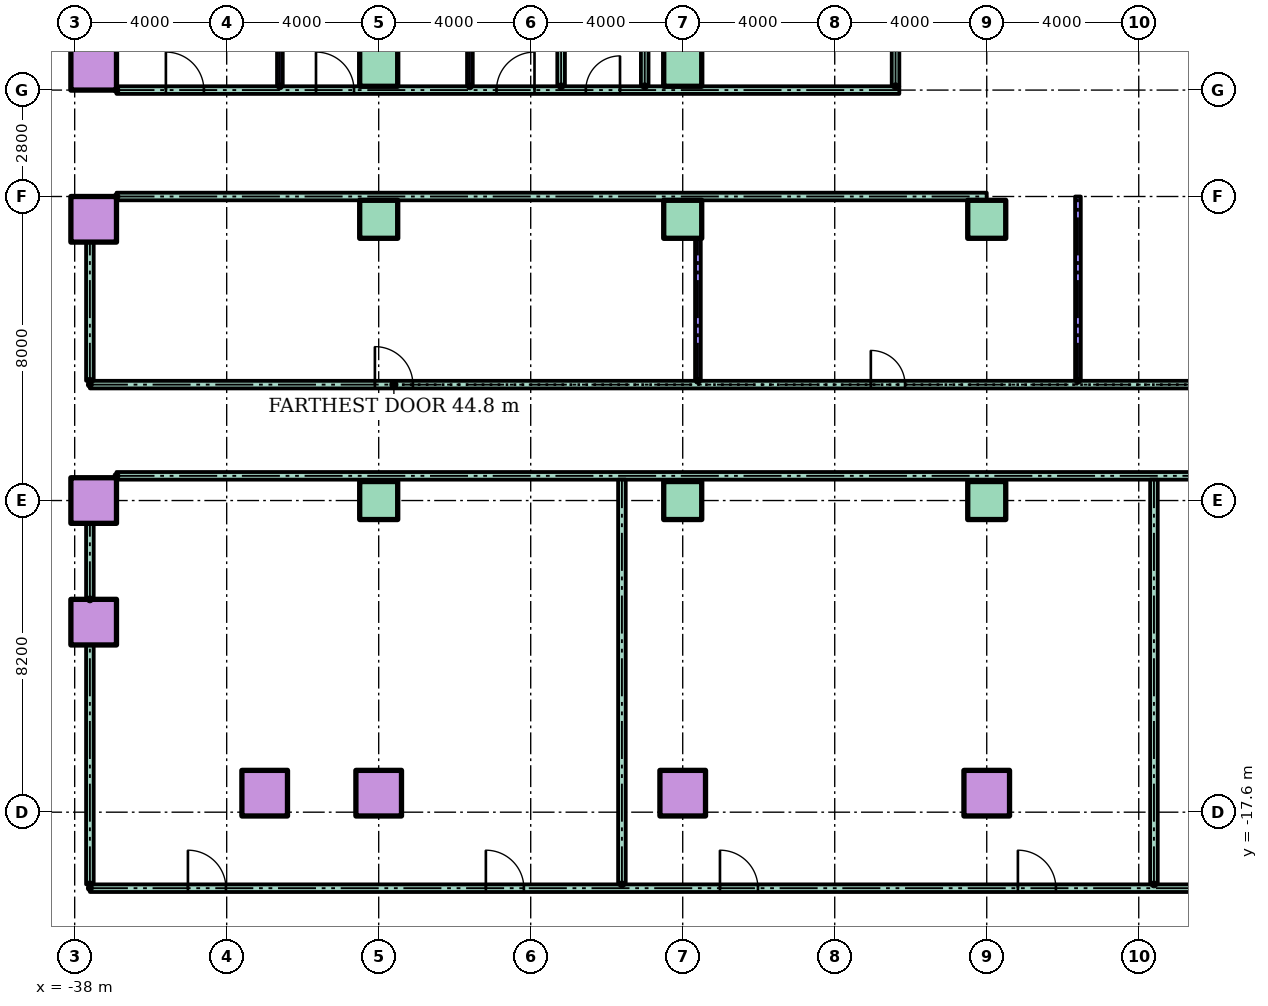
"""IFC4 building model, lengths in metres.
Left out: names, types, materials, properties, quantities, classifications, styles, units other than length and angle.
Written with IfcOpenShell. Run it as: python <this file> out.ifc"""

import sys

from ifc_helpers import new_model, si_unit, direction, frame, frame_2d, origin, origin_2d, place, context, subcontext, project, spatial, rectangle, hollow_rectangle, extrude, element, fill, save


model = new_model("IFC4")
c1 = context("Model", 3, precision=1e-05, world=origin(), true_north=direction((0.0, 1.0)))
c2 = subcontext(c1, "Body", "Model", "MODEL_VIEW")
j1 = project(units=[si_unit("LENGTHUNIT", "METRE"), si_unit("PLANEANGLEUNIT", "RADIAN")], contexts=[c1])
p1 = place(None, origin())
s1 = spatial("IfcSite", under=j1, at=p1, CompositionType="ELEMENT")
p2 = place(p1, origin())
s2 = spatial("IfcBuilding", under=s1, at=p2, CompositionType="ELEMENT")
p3 = place(p2, frame((0.0, 0.0, 18.0)))
s3 = spatial("IfcBuildingStorey", under=s2, at=p3, CompositionType="ELEMENT", Elevation=18.0)
for number, where in (
    (1, (-33.0, -17.1, 0.0)),
    (2, (-30.0, -17.1, 0.0)),
    (3, (-22.0, -17.1, 0.0)),
    (4, (-14.0, -17.1, 0.0)),
    (5, (-37.5, -12.6, 0.0)),
    (6, (-37.5, -9.4, 0.0)),
):
    element("IfcColumn", number, at=place(p3, frame(where)), inside=s3, PredefinedType="COLUMN", context=c2, shape_type="SweptSolid", body=[
        extrude(hollow_rectangle(XDim=1.2, YDim=1.2, WallThickness=0.06, at=origin_2d()), origin(), (0.0, 0.0, 1.0), 4.0),
    ])
for number, where in (
    (7, (-30.0, -9.4, 0.0)),
    (8, (-22.0, -9.4, 0.0)),
    (9, (-14.0, -9.4, 0.0)),
):
    element("IfcColumn", number, at=place(p3, frame(where)), inside=s3, PredefinedType="COLUMN", context=c2, shape_type="SweptSolid", body=[
        extrude(rectangle(XDim=1.0, YDim=1.0, at=origin_2d()), origin(), (0.0, 0.0, 1.0), 4.0),
    ])
p4 = place(p3, frame((-37.5, -2.0, 0.0)))
e10 = element("IfcColumn", 10, at=p4, inside=s3, PredefinedType="COLUMN", context=c2, shape_type="SweptSolid", body=[
    extrude(hollow_rectangle(XDim=1.2, YDim=1.2, WallThickness=0.06, at=origin_2d()), origin(), (0.0, 0.0, 1.0), 4.0),
])
for number, where in (
    (11, (-30.0, -2.0, 0.0)),
    (12, (-22.0, -2.0, 0.0)),
    (13, (-14.0, -2.0, 0.0)),
):
    element("IfcColumn", number, at=place(p3, frame(where)), inside=s3, PredefinedType="COLUMN", context=c2, shape_type="SweptSolid", body=[
        extrude(rectangle(XDim=1.0, YDim=1.0, at=origin_2d()), origin(), (0.0, 0.0, 1.0), 4.0),
    ])
p5 = place(p3, frame((-37.5, 2.0, 0.0)))
e14 = element("IfcColumn", 14, at=p5, inside=s3, PredefinedType="COLUMN", context=c2, shape_type="SweptSolid", body=[
    extrude(hollow_rectangle(XDim=1.2, YDim=1.2, WallThickness=0.06, at=origin_2d()), origin(), (0.0, 0.0, 1.0), 4.0),
])
for number, where in (
    (15, (-30.0, 2.0, 0.0)),
    (16, (-22.0, 2.0, 0.0)),
):
    element("IfcColumn", number, at=place(p3, frame(where)), inside=s3, PredefinedType="COLUMN", context=c2, shape_type="SweptSolid", body=[
        extrude(rectangle(XDim=1.0, YDim=1.0, at=origin_2d()), origin(), (0.0, 0.0, 1.0), 4.0),
    ])
p6 = place(p3, frame((-37.6, -19.6, 0.0)))
e17 = element("IfcWall", 17, at=p6, inside=s3, PredefinedType="PARTITIONING", context=c2, shape_type="SweptSolid", body=[
    extrude(rectangle(XDim=75.2, YDim=0.2, at=frame_2d((37.6, 0.0))), origin(), (0.0, 0.0, 1.0), 3.7),
])
p7 = place(p6, frame((2.58, 0.0, 0.0)))
e18 = element("IfcOpeningElement", 18, at=p7, cuts=e17, PredefinedType="OPENING", context=c2, shape_type="SweptSolid", body=[
    extrude(rectangle(XDim=1.0, YDim=2.1, at=frame_2d((0.5, 1.05))), frame((0.0, 0.11, 0.0), z_axis=(0.0, -1.0, 0.0), x_axis=(1.0, 0.0, 0.0)), (0.0, 0.0, 1.0), 0.22),
])
p8 = place(p6, frame((10.42, 0.0, 0.0)))
e19 = element("IfcOpeningElement", 19, at=p8, cuts=e17, PredefinedType="OPENING", context=c2, shape_type="SweptSolid", body=[
    extrude(rectangle(XDim=1.0, YDim=2.1, at=frame_2d((0.5, 1.05))), frame((0.0, 0.11, 0.0), z_axis=(0.0, -1.0, 0.0), x_axis=(1.0, 0.0, 0.0)), (0.0, 0.0, 1.0), 0.22),
])
p9 = place(p6, frame((16.58, 0.0, 0.0)))
e20 = element("IfcOpeningElement", 20, at=p9, cuts=e17, PredefinedType="OPENING", context=c2, shape_type="SweptSolid", body=[
    extrude(rectangle(XDim=1.0, YDim=2.1, at=frame_2d((0.5, 1.05))), frame((0.0, 0.11, 0.0), z_axis=(0.0, -1.0, 0.0), x_axis=(1.0, 0.0, 0.0)), (0.0, 0.0, 1.0), 0.22),
])
p10 = place(p6, frame((24.42, 0.0, 0.0)))
e21 = element("IfcOpeningElement", 21, at=p10, cuts=e17, PredefinedType="OPENING", context=c2, shape_type="SweptSolid", body=[
    extrude(rectangle(XDim=1.0, YDim=2.1, at=frame_2d((0.5, 1.05))), frame((0.0, 0.11, 0.0), z_axis=(0.0, -1.0, 0.0), x_axis=(1.0, 0.0, 0.0)), (0.0, 0.0, 1.0), 0.22),
])
p11 = place(p6, frame((33.0, 0.0, 0.0)))
e22 = element("IfcOpeningElement", 22, at=p11, cuts=e17, PredefinedType="OPENING", context=c2, shape_type="SweptSolid", body=[
    extrude(rectangle(XDim=1.0, YDim=2.1, at=frame_2d((0.5, 1.05))), frame((0.0, 0.11, 0.0), z_axis=(0.0, -1.0, 0.0), x_axis=(1.0, 0.0, 0.0)), (0.0, 0.0, 1.0), 0.22),
])
p12 = place(p6, frame((44.0, 0.0, 0.0)))
e23 = element("IfcOpeningElement", 23, at=p12, cuts=e17, PredefinedType="OPENING", context=c2, shape_type="SweptSolid", body=[
    extrude(rectangle(XDim=1.0, YDim=2.1, at=frame_2d((0.5, 1.05))), frame((0.0, 0.11, 0.0), z_axis=(0.0, -1.0, 0.0), x_axis=(1.0, 0.0, 0.0)), (0.0, 0.0, 1.0), 0.22),
])
p13 = place(p6, frame((55.8, 0.0, 0.0)))
e24 = element("IfcOpeningElement", 24, at=p13, cuts=e17, PredefinedType="OPENING", context=c2, shape_type="SweptSolid", body=[
    extrude(rectangle(XDim=1.0, YDim=2.1, at=frame_2d((0.5, 1.05))), frame((0.0, 0.11, 0.0), z_axis=(0.0, -1.0, 0.0), x_axis=(1.0, 0.0, 0.0)), (0.0, 0.0, 1.0), 0.22),
])
p14 = place(p6, frame((68.45, 0.0, 0.0)))
e25 = element("IfcOpeningElement", 25, at=p14, cuts=e17, PredefinedType="OPENING", context=c2, shape_type="SweptSolid", body=[
    extrude(rectangle(XDim=0.9, YDim=2.1, at=frame_2d((0.45, 1.05))), frame((0.0, 0.11, 0.0), z_axis=(0.0, -1.0, 0.0), x_axis=(1.0, 0.0, 0.0)), (0.0, 0.0, 1.0), 0.22),
])
p15 = place(p3, frame((-36.9, -8.75, 0.0)))
e26 = element("IfcWall", 26, at=p15, inside=s3, PredefinedType="PARTITIONING", context=c2, shape_type="SweptSolid", body=[
    extrude(rectangle(XDim=73.8, YDim=0.2, at=frame_2d((36.9, 0.0))), origin(), (0.0, 0.0, 1.0), 3.7),
])
p16 = place(p3, frame((-37.6, -6.35, 0.0)))
e27 = element("IfcWall", 27, at=p16, inside=s3, PredefinedType="PARTITIONING", context=c2, shape_type="SweptSolid", body=[
    extrude(rectangle(XDim=75.2, YDim=0.2, at=frame_2d((37.6, 0.0))), origin(), (0.0, 0.0, 1.0), 3.7),
])
p17 = place(p16, frame((7.5, 0.0, 0.0)))
e28 = element("IfcOpeningElement", 28, at=p17, cuts=e27, PredefinedType="OPENING", context=c2, shape_type="SweptSolid", body=[
    extrude(rectangle(XDim=1.0, YDim=2.1, at=frame_2d((0.5, 1.05))), frame((0.0, 0.11, 0.0), z_axis=(0.0, -1.0, 0.0), x_axis=(1.0, 0.0, 0.0)), (0.0, 0.0, 1.0), 0.22),
])
p18 = place(p16, frame((20.55, 0.0, 0.0)))
e29 = element("IfcOpeningElement", 29, at=p18, cuts=e27, PredefinedType="OPENING", context=c2, shape_type="SweptSolid", body=[
    extrude(rectangle(XDim=0.9, YDim=2.1, at=frame_2d((0.45, 1.05))), frame((0.0, 0.11, 0.0), z_axis=(0.0, -1.0, 0.0), x_axis=(1.0, 0.0, 0.0)), (0.0, 0.0, 1.0), 0.22),
])
p19 = place(p16, frame((30.55, 0.0, 0.0)))
e30 = element("IfcOpeningElement", 30, at=p19, cuts=e27, PredefinedType="OPENING", context=c2, shape_type="SweptSolid", body=[
    extrude(rectangle(XDim=0.9, YDim=2.1, at=frame_2d((0.45, 1.05))), frame((0.0, 0.11, 0.0), z_axis=(0.0, -1.0, 0.0), x_axis=(1.0, 0.0, 0.0)), (0.0, 0.0, 1.0), 0.22),
])
p20 = place(p16, frame((41.5, 0.0, 0.0)))
e31 = element("IfcOpeningElement", 31, at=p20, cuts=e27, PredefinedType="OPENING", context=c2, shape_type="SweptSolid", body=[
    extrude(rectangle(XDim=1.0, YDim=2.1, at=frame_2d((0.5, 1.05))), frame((0.0, 0.11, 0.0), z_axis=(0.0, -1.0, 0.0), x_axis=(1.0, 0.0, 0.0)), (0.0, 0.0, 1.0), 0.22),
])
p21 = place(p16, frame((61.1, 0.0, 0.0)))
e32 = element("IfcOpeningElement", 32, at=p21, cuts=e27, PredefinedType="OPENING", context=c2, shape_type="SweptSolid", body=[
    extrude(rectangle(XDim=1.0, YDim=2.1, at=frame_2d((0.5, 1.05))), frame((0.0, 0.11, 0.0), z_axis=(0.0, -1.0, 0.0), x_axis=(1.0, 0.0, 0.0)), (0.0, 0.0, 1.0), 0.22),
])
p22 = place(p3, frame((-36.9, -1.4, 0.0)))
e33 = element("IfcWall", 33, at=p22, inside=s3, PredefinedType="PARTITIONING", context=c2, shape_type="SweptSolid", body=[
    extrude(rectangle(XDim=22.9, YDim=0.2, at=frame_2d((11.45, 0.0))), origin(), (0.0, 0.0, 1.0), 3.7),
])
p23 = place(p3, frame((-36.9, 1.4, 0.0)))
e34 = element("IfcWall", 34, at=p23, inside=s3, PredefinedType="PARTITIONING", context=c2, shape_type="SweptSolid", body=[
    extrude(rectangle(XDim=20.6, YDim=0.2, at=frame_2d((10.3, 0.0))), origin(), (0.0, 0.0, 1.0), 3.7),
])
p24 = place(p23, frame((1.3, 0.0, 0.0)))
e35 = element("IfcOpeningElement", 35, at=p24, cuts=e34, PredefinedType="OPENING", context=c2, shape_type="SweptSolid", body=[
    extrude(rectangle(XDim=1.0, YDim=2.1, at=frame_2d((0.5, 1.05))), frame((0.0, 0.11, 0.0), z_axis=(0.0, -1.0, 0.0), x_axis=(1.0, 0.0, 0.0)), (0.0, 0.0, 1.0), 0.22),
])
p25 = place(p23, frame((5.25, 0.0, 0.0)))
e36 = element("IfcOpeningElement", 36, at=p25, cuts=e34, PredefinedType="OPENING", context=c2, shape_type="SweptSolid", body=[
    extrude(rectangle(XDim=1.0, YDim=2.1, at=frame_2d((0.5, 1.05))), frame((0.0, 0.11, 0.0), z_axis=(0.0, -1.0, 0.0), x_axis=(1.0, 0.0, 0.0)), (0.0, 0.0, 1.0), 0.22),
])
p26 = place(p23, frame((10.0, 0.0, 0.0)))
e37 = element("IfcOpeningElement", 37, at=p26, cuts=e34, PredefinedType="OPENING", context=c2, shape_type="SweptSolid", body=[
    extrude(rectangle(XDim=1.0, YDim=2.1, at=frame_2d((0.5, 1.05))), frame((0.0, 0.11, 0.0), z_axis=(0.0, -1.0, 0.0), x_axis=(1.0, 0.0, 0.0)), (0.0, 0.0, 1.0), 0.22),
])
p27 = place(p23, frame((12.35, 0.0, 0.0)))
e38 = element("IfcOpeningElement", 38, at=p27, cuts=e34, PredefinedType="OPENING", context=c2, shape_type="SweptSolid", body=[
    extrude(rectangle(XDim=0.9, YDim=2.1, at=frame_2d((0.45, 1.05))), frame((0.0, 0.11, 0.0), z_axis=(0.0, -1.0, 0.0), x_axis=(1.0, 0.0, 0.0)), (0.0, 0.0, 1.0), 0.22),
])
p28 = place(p3, frame((-37.6, -19.5, 0.0), z_axis=(0.0, 0.0, 1.0), x_axis=(0.0, 1.0, 0.0)))
e39 = element("IfcWall", 39, at=p28, inside=s3, PredefinedType="PARTITIONING", context=c2, shape_type="SweptSolid", body=[
    extrude(rectangle(XDim=6.3, YDim=0.2, at=frame_2d((3.15, 0.0))), origin(), (0.0, 0.0, 1.0), 3.7),
])
p29 = place(p3, frame((-37.6, -12.0, 0.0), z_axis=(0.0, 0.0, 1.0), x_axis=(0.0, 1.0, 0.0)))
e40 = element("IfcWall", 40, at=p29, inside=s3, PredefinedType="PARTITIONING", context=c2, shape_type="SweptSolid", body=[
    extrude(rectangle(XDim=2.0, YDim=0.2, at=frame_2d((1.0, 0.0))), origin(), (0.0, 0.0, 1.0), 3.7),
])
p30 = place(p3, frame((-37.6, -6.25, 0.0), z_axis=(0.0, 0.0, 1.0), x_axis=(0.0, 1.0, 0.0)))
e41 = element("IfcWall", 41, at=p30, inside=s3, PredefinedType="PARTITIONING", context=c2, shape_type="SweptSolid", body=[
    extrude(rectangle(XDim=3.65, YDim=0.2, at=frame_2d((1.825, 0.0))), origin(), (0.0, 0.0, 1.0), 3.7),
])
for number, where, z_axis, x_axis in (
    (42, (-32.6, 1.5, 0.0), (0.0, 0.0, 1.0), (0.0, 1.0, 0.0)),
    (43, (-27.6, 1.5, 0.0), (0.0, 0.0, 1.0), (0.0, 1.0, 0.0)),
):
    element("IfcWall", number, at=place(p3, frame(where, z_axis=z_axis, x_axis=x_axis)), inside=s3, PredefinedType="PARTITIONING", context=c2, shape_type="SweptSolid", body=[
        extrude(rectangle(XDim=7.0, YDim=0.15, at=frame_2d((3.5, 0.0))), origin(), (0.0, 0.0, 1.0), 3.7),
    ])
p31 = place(p3, frame((-25.2, 1.5, 0.0), z_axis=(0.0, 0.0, 1.0), x_axis=(0.0, 1.0, 0.0)))
e44 = element("IfcWall", 44, at=p31, inside=s3, PredefinedType="PARTITIONING", context=c2, shape_type="SweptSolid", body=[
    extrude(rectangle(XDim=7.0, YDim=0.2, at=frame_2d((3.5, 0.0))), origin(), (0.0, 0.0, 1.0), 3.7),
])
p32 = place(p3, frame((-23.6, -19.5, 0.0), z_axis=(0.0, 0.0, 1.0), x_axis=(0.0, 1.0, 0.0)))
e45 = element("IfcWall", 45, at=p32, inside=s3, PredefinedType="PARTITIONING", context=c2, shape_type="SweptSolid", body=[
    extrude(rectangle(XDim=10.65, YDim=0.2, at=frame_2d((5.325, 0.0))), origin(), (0.0, 0.0, 1.0), 3.7),
])
p33 = place(p3, frame((-23.0, 1.5, 0.0), z_axis=(0.0, 0.0, 1.0), x_axis=(0.0, 1.0, 0.0)))
e46 = element("IfcWall", 46, at=p33, inside=s3, PredefinedType="PARTITIONING", context=c2, shape_type="SweptSolid", body=[
    extrude(rectangle(XDim=7.0, YDim=0.2, at=frame_2d((3.5, 0.0))), origin(), (0.0, 0.0, 1.0), 3.7),
])
p34 = place(p3, frame((-21.6, -6.25, 0.0), z_axis=(0.0, 0.0, 1.0), x_axis=(0.0, 1.0, 0.0)))
e47 = element("IfcWall", 47, at=p34, inside=s3, PredefinedType="PARTITIONING", context=c2, shape_type="SweptSolid", body=[
    extrude(rectangle(XDim=3.75, YDim=0.15, at=frame_2d((1.875, 0.0))), origin(), (0.0, 0.0, 1.0), 3.7),
])
p35 = place(p3, frame((-16.4, 1.5, 0.0), z_axis=(0.0, 0.0, 1.0), x_axis=(0.0, 1.0, 0.0)))
e48 = element("IfcWall", 48, at=p35, inside=s3, PredefinedType="PARTITIONING", context=c2, shape_type="SweptSolid", body=[
    extrude(rectangle(XDim=7.0, YDim=0.2, at=frame_2d((3.5, 0.0))), origin(), (0.0, 0.0, 1.0), 3.7),
])
p36 = place(p35, frame((3.0, 0.0, 0.0)))
e49 = element("IfcOpeningElement", 49, at=p36, cuts=e48, PredefinedType="OPENING", context=c2, shape_type="SweptSolid", body=[
    extrude(rectangle(XDim=1.0, YDim=2.1, at=frame_2d((0.5, 1.05))), frame((0.0, 0.11, 0.0), z_axis=(0.0, -1.0, 0.0), x_axis=(1.0, 0.0, 0.0)), (0.0, 0.0, 1.0), 0.22),
])
p37 = place(p3, frame((-11.6, -6.25, 0.0), z_axis=(0.0, 0.0, 1.0), x_axis=(0.0, 1.0, 0.0)))
e50 = element("IfcWall", 50, at=p37, inside=s3, PredefinedType="PARTITIONING", context=c2, shape_type="SweptSolid", body=[
    extrude(rectangle(XDim=4.85, YDim=0.15, at=frame_2d((2.425, 0.0))), origin(), (0.0, 0.0, 1.0), 3.7),
])
p38 = place(p3, frame((-9.6, -19.5, 0.0), z_axis=(0.0, 0.0, 1.0), x_axis=(0.0, 1.0, 0.0)))
e51 = element("IfcWall", 51, at=p38, inside=s3, PredefinedType="PARTITIONING", context=c2, shape_type="SweptSolid", body=[
    extrude(rectangle(XDim=10.65, YDim=0.2, at=frame_2d((5.325, 0.0))), origin(), (0.0, 0.0, 1.0), 3.7),
])
p39 = place(p7, origin())
e52 = element("IfcDoor", 52, at=p39, inside=s3, OperationType="SINGLE_SWING_LEFT", PredefinedType="DOOR", context=c2, shape_type="SweptSolid", body=[
    extrude(rectangle(XDim=1.0, YDim=2.1, at=frame_2d((0.5, 1.05))), frame((0.0, 0.025, 0.0), z_axis=(0.0, -1.0, 0.0), x_axis=(1.0, 0.0, 0.0)), (0.0, 0.0, 1.0), 0.05),
])
fill(e18, e52)
p40 = place(p8, origin())
e53 = element("IfcDoor", 53, at=p40, inside=s3, OperationType="SINGLE_SWING_LEFT", PredefinedType="DOOR", context=c2, shape_type="SweptSolid", body=[
    extrude(rectangle(XDim=1.0, YDim=2.1, at=frame_2d((0.5, 1.05))), frame((0.0, 0.025, 0.0), z_axis=(0.0, -1.0, 0.0), x_axis=(1.0, 0.0, 0.0)), (0.0, 0.0, 1.0), 0.05),
])
fill(e19, e53)
p41 = place(p9, origin())
e54 = element("IfcDoor", 54, at=p41, inside=s3, OperationType="SINGLE_SWING_LEFT", PredefinedType="DOOR", context=c2, shape_type="SweptSolid", body=[
    extrude(rectangle(XDim=1.0, YDim=2.1, at=frame_2d((0.5, 1.05))), frame((0.0, 0.025, 0.0), z_axis=(0.0, -1.0, 0.0), x_axis=(1.0, 0.0, 0.0)), (0.0, 0.0, 1.0), 0.05),
])
fill(e20, e54)
p42 = place(p10, origin())
e55 = element("IfcDoor", 55, at=p42, inside=s3, OperationType="SINGLE_SWING_LEFT", PredefinedType="DOOR", context=c2, shape_type="SweptSolid", body=[
    extrude(rectangle(XDim=1.0, YDim=2.1, at=frame_2d((0.5, 1.05))), frame((0.0, 0.025, 0.0), z_axis=(0.0, -1.0, 0.0), x_axis=(1.0, 0.0, 0.0)), (0.0, 0.0, 1.0), 0.05),
])
fill(e21, e55)
p43 = place(p17, origin())
e56 = element("IfcDoor", 56, at=p43, inside=s3, OperationType="SINGLE_SWING_LEFT", PredefinedType="DOOR", context=c2, shape_type="SweptSolid", body=[
    extrude(rectangle(XDim=1.0, YDim=2.1, at=frame_2d((0.5, 1.05))), frame((0.0, 0.025, 0.0), z_axis=(0.0, -1.0, 0.0), x_axis=(1.0, 0.0, 0.0)), (0.0, 0.0, 1.0), 0.05),
])
fill(e28, e56)
p44 = place(p18, origin())
e57 = element("IfcDoor", 57, at=p44, inside=s3, OperationType="SINGLE_SWING_LEFT", PredefinedType="DOOR", context=c2, shape_type="SweptSolid", body=[
    extrude(rectangle(XDim=0.9, YDim=2.1, at=frame_2d((0.45, 1.05))), frame((0.0, 0.025, 0.0), z_axis=(0.0, -1.0, 0.0), x_axis=(1.0, 0.0, 0.0)), (0.0, 0.0, 1.0), 0.05),
])
fill(e29, e57)
p45 = place(p24, origin())
e58 = element("IfcDoor", 58, at=p45, inside=s3, OperationType="SINGLE_SWING_LEFT", PredefinedType="DOOR", context=c2, shape_type="SweptSolid", body=[
    extrude(rectangle(XDim=1.0, YDim=2.1, at=frame_2d((0.5, 1.05))), frame((0.0, 0.025, 0.0), z_axis=(0.0, -1.0, 0.0), x_axis=(1.0, 0.0, 0.0)), (0.0, 0.0, 1.0), 0.05),
])
fill(e35, e58)
p46 = place(p25, origin())
e59 = element("IfcDoor", 59, at=p46, inside=s3, OperationType="SINGLE_SWING_LEFT", PredefinedType="DOOR", context=c2, shape_type="SweptSolid", body=[
    extrude(rectangle(XDim=1.0, YDim=2.1, at=frame_2d((0.5, 1.05))), frame((0.0, 0.025, 0.0), z_axis=(0.0, -1.0, 0.0), x_axis=(1.0, 0.0, 0.0)), (0.0, 0.0, 1.0), 0.05),
])
fill(e36, e59)
p47 = place(p26, origin())
e60 = element("IfcDoor", 60, at=p47, inside=s3, OperationType="SINGLE_SWING_RIGHT", PredefinedType="DOOR", context=c2, shape_type="SweptSolid", body=[
    extrude(rectangle(XDim=1.0, YDim=2.1, at=frame_2d((0.5, 1.05))), frame((0.0, 0.025, 0.0), z_axis=(0.0, -1.0, 0.0), x_axis=(1.0, 0.0, 0.0)), (0.0, 0.0, 1.0), 0.05),
])
fill(e37, e60)
p48 = place(p27, origin())
e61 = element("IfcDoor", 61, at=p48, inside=s3, OperationType="SINGLE_SWING_RIGHT", PredefinedType="DOOR", context=c2, shape_type="SweptSolid", body=[
    extrude(rectangle(XDim=0.9, YDim=2.1, at=frame_2d((0.45, 1.05))), frame((0.0, 0.025, 0.0), z_axis=(0.0, -1.0, 0.0), x_axis=(1.0, 0.0, 0.0)), (0.0, 0.0, 1.0), 0.05),
])
fill(e38, e61)
save(model, sys.argv[1])
